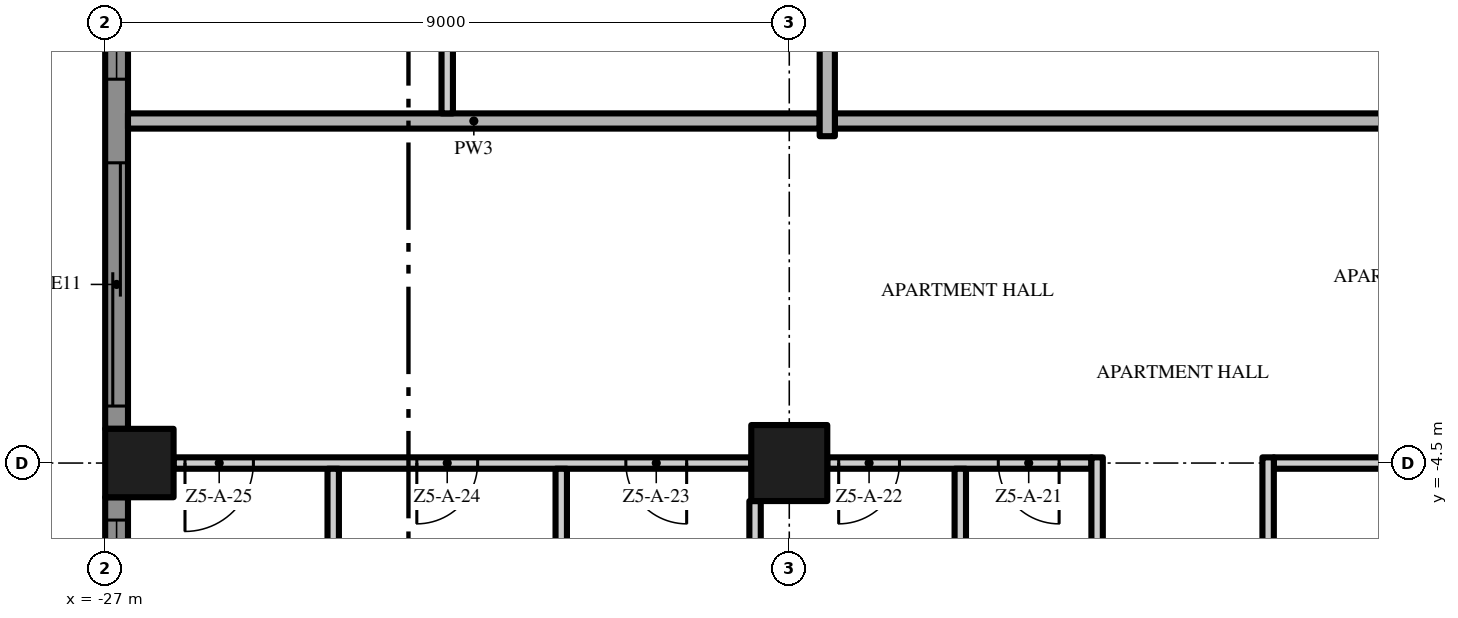
"""IFC4 building model, lengths in metres.
Left out: names, types, materials, properties, quantities, classifications, styles, units other than length and angle.
Written with IfcOpenShell. Run it as: python <this file> out.ifc"""

import sys

from ifc_helpers import new_model, si_unit, direction, frame, frame_2d, origin, origin_2d, place, context, subcontext, project, spatial, polyline, rectangle, outline, extrude, element, fill, save


model = new_model("IFC4")
c1 = context("Model", 3, precision=1e-05, world=origin(), true_north=direction((0.0, 1.0)))
c2 = subcontext(c1, "Body", "Model", "MODEL_VIEW")
j1 = project(units=[si_unit("LENGTHUNIT", "METRE"), si_unit("PLANEANGLEUNIT", "RADIAN")], contexts=[c1])
p1 = place(None, origin())
s1 = spatial("IfcSite", under=j1, at=p1, CompositionType="ELEMENT")
p2 = place(p1, origin())
s2 = spatial("IfcBuilding", under=s1, at=p2, CompositionType="ELEMENT")
p3 = place(p2, frame((0.0, 0.0, 242.6)))
s3 = spatial("IfcBuildingStorey", under=s2, at=p3, CompositionType="ELEMENT", Elevation=242.6)
p4 = place(p3, frame((-18.0, -4.5, 0.0), z_axis=(0.0, 0.0, 1.0), x_axis=(1.0, 0.0, 0.0)))
e1 = element("IfcColumn", 1, at=p4, inside=s3, PredefinedType="COLUMN", context=c2, shape_type="SweptSolid", body=[
    extrude(rectangle(XDim=1.0, YDim=1.0, at=origin_2d()), origin(), (0.0, 0.0, 1.0), 3.5),
])
p5 = place(p3, frame((-26.55, -4.5, 0.0), z_axis=(0.0, 0.0, 1.0), x_axis=(1.0, 0.0, 0.0)))
e2 = element("IfcColumn", 2, at=p5, inside=s3, PredefinedType="COLUMN", context=c2, shape_type="SweptSolid", body=[
    extrude(rectangle(XDim=0.9, YDim=0.9, at=origin_2d()), origin(), (0.0, 0.0, 1.0), 3.5),
])
p6 = place(p3, frame((-26.85, -4.05, 0.0), z_axis=(0.0, 0.0, 1.0), x_axis=(0.0, 1.0, 0.0)))
e3 = element("IfcWall", 3, at=p6, inside=s3, PredefinedType="SOLIDWALL", context=c2, shape_type="SweptSolid", body=[
    extrude(rectangle(XDim=8.1, YDim=0.3, at=frame_2d((4.05, 0.0))), origin(), (0.0, 0.0, 1.0), 3.5),
])
p7 = place(p6, frame((4.6, 0.0, 0.45)))
e4 = element("IfcOpeningElement", 4, at=p7, cuts=e3, PredefinedType="OPENING", context=c2, shape_type="SweptSolid", body=[
    extrude(rectangle(XDim=3.2, YDim=2.65, at=frame_2d((1.6, 1.325))), frame((0.0, 0.16, 0.0), z_axis=(0.0, -1.0, 0.0), x_axis=(1.0, 0.0, 0.0)), (0.0, 0.0, 1.0), 0.32),
])
p8 = place(p6, frame((0.3, 0.0, 0.0)))
e5 = element("IfcOpeningElement", 5, at=p8, cuts=e3, PredefinedType="OPENING", context=c2, shape_type="SweptSolid", body=[
    extrude(rectangle(XDim=3.2, YDim=2.4, at=frame_2d((1.6, 1.2))), frame((0.0, 0.16, 0.0), z_axis=(0.0, -1.0, 0.0), x_axis=(1.0, 0.0, 0.0)), (0.0, 0.0, 1.0), 0.32),
])
p9 = place(p3, frame((-26.85, -13.05, 0.0), z_axis=(0.0, 0.0, 1.0), x_axis=(0.0, 1.0, 0.0)))
e6 = element("IfcWall", 6, at=p9, inside=s3, PredefinedType="SOLIDWALL", context=c2, shape_type="SweptSolid", body=[
    extrude(rectangle(XDim=8.1, YDim=0.3, at=frame_2d((4.05, 0.0))), origin(), (0.0, 0.0, 1.0), 3.5),
])
p10 = place(p9, frame((4.6, 0.0, 0.45)))
e7 = element("IfcOpeningElement", 7, at=p10, cuts=e6, PredefinedType="OPENING", context=c2, shape_type="SweptSolid", body=[
    extrude(rectangle(XDim=3.2, YDim=2.65, at=frame_2d((1.6, 1.325))), frame((0.0, 0.16, 0.0), z_axis=(0.0, -1.0, 0.0), x_axis=(1.0, 0.0, 0.0)), (0.0, 0.0, 1.0), 0.32),
])
p11 = place(p9, frame((0.3, 0.0, 0.45)))
e8 = element("IfcOpeningElement", 8, at=p11, cuts=e6, PredefinedType="OPENING", context=c2, shape_type="SweptSolid", body=[
    extrude(rectangle(XDim=3.2, YDim=2.65, at=frame_2d((1.6, 1.325))), frame((0.0, 0.16, 0.0), z_axis=(0.0, -1.0, 0.0), x_axis=(1.0, 0.0, 0.0)), (0.0, 0.0, 1.0), 0.32),
])
p12 = place(p3, origin())
e9 = element("IfcWall", 9, at=p12, inside=s3, PredefinedType="USERDEFINED", context=c2, shape_type="SweptSolid", body=[
    extrude(outline(polyline([(-28.8, 18.0), (-29.505, 16.5), (-29.941, 15.0), (-30.0, 14.25), (-29.941, 13.5), (-29.505, 12.0), (-28.8, 10.5), (-28.095, 9.0), (-27.659, 7.5), (-27.6, 6.75), (-27.659, 6.0), (-28.095, 4.5), (-28.8, 3.0), (-29.505, 1.5), (-29.941, 0.0), (-30.0, -0.75), (-29.941, -1.5), (-29.505, -3.0), (-28.8, -4.5), (-28.095, -6.0), (-27.659, -7.5), (-27.6, -8.25), (-27.659, -9.0), (-28.095, -10.5), (-28.8, -12.0), (-29.505, -13.5), (-29.941, -15.0), (-30.0, -15.75), (-29.941, -16.5), (-29.505, -18.0), (-29.265, -17.93), (-29.694, -16.455), (-29.749, -15.75), (-29.694, -15.045), (-29.271, -13.589), (-28.574, -12.106), (-27.86, -10.589), (-27.411, -9.045), (-27.349, -8.25), (-27.411, -7.455), (-27.86, -5.911), (-28.574, -4.394), (-29.271, -2.911), (-29.694, -1.455), (-29.749, -0.75), (-29.694, -0.045), (-29.271, 1.411), (-28.574, 2.894), (-27.86, 4.411), (-27.411, 5.955), (-27.349, 6.75), (-27.411, 7.545), (-27.86, 9.089), (-28.574, 10.606), (-29.271, 12.089), (-29.694, 13.545), (-29.749, 14.25), (-29.694, 14.955), (-29.271, 16.411), (-28.574, 17.894), (-28.8, 18.0)])), origin(), (0.0, 0.0, 1.0), 0.9),
])
p13 = place(p3, frame((-18.5, -4.5, 0.0), z_axis=(0.0, 0.0, 1.0), x_axis=(-1.0, 0.0, 0.0)))
e10 = element("IfcWall", 10, at=p13, inside=s3, PredefinedType="PARTITIONING", context=c2, shape_type="SweptSolid", body=[
    extrude(rectangle(XDim=7.6, YDim=0.15, at=frame_2d((3.8, 0.0))), origin(), (0.0, 0.0, 1.0), 3.5),
])
p14 = place(p13, frame((0.85, 0.0, 0.0)))
e11 = element("IfcOpeningElement", 11, at=p14, cuts=e10, PredefinedType="OPENING", context=c2, shape_type="SweptSolid", body=[
    extrude(rectangle(XDim=0.8, YDim=2.0, at=frame_2d((0.4, 1.0))), frame((0.0, 0.085, 0.0), z_axis=(0.0, -1.0, 0.0), x_axis=(1.0, 0.0, 0.0)), (0.0, 0.0, 1.0), 0.17),
])
p15 = place(p13, frame((3.6, 0.0, 0.0)))
e12 = element("IfcOpeningElement", 12, at=p15, cuts=e10, PredefinedType="OPENING", context=c2, shape_type="SweptSolid", body=[
    extrude(rectangle(XDim=0.8, YDim=2.0, at=frame_2d((0.4, 1.0))), frame((0.0, 0.085, 0.0), z_axis=(0.0, -1.0, 0.0), x_axis=(1.0, 0.0, 0.0)), (0.0, 0.0, 1.0), 0.17),
])
p16 = place(p13, frame((6.55, 0.0, 0.0)))
e13 = element("IfcOpeningElement", 13, at=p16, cuts=e10, PredefinedType="OPENING", context=c2, shape_type="SweptSolid", body=[
    extrude(rectangle(XDim=0.9, YDim=2.1, at=frame_2d((0.45, 1.05))), frame((0.0, 0.085, 0.0), z_axis=(0.0, -1.0, 0.0), x_axis=(1.0, 0.0, 0.0)), (0.0, 0.0, 1.0), 0.17),
])
p17 = place(p3, frame((-14.025, -4.5, 0.0), z_axis=(0.0, 0.0, 1.0), x_axis=(-1.0, 0.0, 0.0)))
e14 = element("IfcWall", 14, at=p17, inside=s3, PredefinedType="PARTITIONING", context=c2, shape_type="SweptSolid", body=[
    extrude(rectangle(XDim=3.475, YDim=0.15, at=frame_2d((1.738, 0.0))), origin(), (0.0, 0.0, 1.0), 3.5),
])
p18 = place(p17, frame((0.425, 0.0, 0.0)))
e15 = element("IfcOpeningElement", 15, at=p18, cuts=e14, PredefinedType="OPENING", context=c2, shape_type="SweptSolid", body=[
    extrude(rectangle(XDim=0.8, YDim=2.0, at=frame_2d((0.4, 1.0))), frame((0.0, 0.085, 0.0), z_axis=(0.0, -1.0, 0.0), x_axis=(1.0, 0.0, 0.0)), (0.0, 0.0, 1.0), 0.17),
])
p19 = place(p17, frame((2.525, 0.0, 0.0)))
e16 = element("IfcOpeningElement", 16, at=p19, cuts=e14, PredefinedType="OPENING", context=c2, shape_type="SweptSolid", body=[
    extrude(rectangle(XDim=0.8, YDim=2.0, at=frame_2d((0.4, 1.0))), frame((0.0, 0.085, 0.0), z_axis=(0.0, -1.0, 0.0), x_axis=(1.0, 0.0, 0.0)), (0.0, 0.0, 1.0), 0.17),
])
p20 = place(p3, frame((-11.625, -4.5, 0.0), z_axis=(0.0, 0.0, 1.0), x_axis=(1.0, 0.0, 0.0)))
e17 = element("IfcWall", 17, at=p20, inside=s3, PredefinedType="PARTITIONING", context=c2, shape_type="SweptSolid", body=[
    extrude(rectangle(XDim=2.125, YDim=0.15, at=frame_2d((1.062, 0.0))), origin(), (0.0, 0.0, 1.0), 3.5),
])
p21 = place(p3, frame((17.4, 0.0, 0.0), z_axis=(0.0, 0.0, 1.0), x_axis=(-1.0, 0.0, 0.0)))
e18 = element("IfcWall", 18, at=p21, inside=s3, PredefinedType="PARTITIONING", context=c2, shape_type="SweptSolid", body=[
    extrude(rectangle(XDim=34.8, YDim=0.2, at=frame_2d((17.4, 0.0))), origin(), (0.0, 0.0, 1.0), 3.5),
])
p22 = place(p21, frame((25.65, 0.0, 0.0)))
e19 = element("IfcOpeningElement", 19, at=p22, cuts=e18, PredefinedType="OPENING", context=c2, shape_type="SweptSolid", body=[
    extrude(rectangle(XDim=1.5, YDim=2.4, at=frame_2d((0.75, 1.2))), frame((0.0, 0.11, 0.0), z_axis=(0.0, -1.0, 0.0), x_axis=(1.0, 0.0, 0.0)), (0.0, 0.0, 1.0), 0.22),
])
p23 = place(p21, frame((7.65, 0.0, 0.0)))
e20 = element("IfcOpeningElement", 20, at=p23, cuts=e18, PredefinedType="OPENING", context=c2, shape_type="SweptSolid", body=[
    extrude(rectangle(XDim=1.5, YDim=2.4, at=frame_2d((0.75, 1.2))), frame((0.0, 0.11, 0.0), z_axis=(0.0, -1.0, 0.0), x_axis=(1.0, 0.0, 0.0)), (0.0, 0.0, 1.0), 0.22),
])
p24 = place(p3, frame((-26.7, 0.0, 0.0), z_axis=(0.0, 0.0, 1.0), x_axis=(1.0, 0.0, 0.0)))
e21 = element("IfcWall", 21, at=p24, inside=s3, PredefinedType="PARTITIONING", context=c2, shape_type="SweptSolid", body=[
    extrude(rectangle(XDim=9.1, YDim=0.2, at=frame_2d((4.55, 0.0))), origin(), (0.0, 0.0, 1.0), 3.5),
])
p25 = place(p3, frame((-24.0, -8.925, 0.0), z_axis=(0.0, 0.0, 1.0), x_axis=(0.0, 1.0, 0.0)))
e22 = element("IfcWall", 22, at=p25, inside=s3, PredefinedType="PARTITIONING", context=c2, shape_type="SweptSolid", body=[
    extrude(rectangle(XDim=4.35, YDim=0.15, at=frame_2d((2.175, 0.0))), origin(), (0.0, 0.0, 1.0), 3.5),
])
p26 = place(p3, frame((-22.5, 0.1, 0.0), z_axis=(0.0, 0.0, 1.0), x_axis=(0.0, 1.0, 0.0)))
e23 = element("IfcWall", 23, at=p26, inside=s3, PredefinedType="PARTITIONING", context=c2, shape_type="SweptSolid", body=[
    extrude(rectangle(XDim=17.45, YDim=0.15, at=frame_2d((8.725, 0.0))), origin(), (0.0, 0.0, 1.0), 3.5),
])
p27 = place(p26, frame((1.65, 0.0, 0.0)))
e24 = element("IfcOpeningElement", 24, at=p27, cuts=e23, PredefinedType="OPENING", context=c2, shape_type="SweptSolid", body=[
    extrude(rectangle(XDim=1.0, YDim=2.4, at=frame_2d((0.5, 1.2))), frame((0.0, 0.085, 0.0), z_axis=(0.0, -1.0, 0.0), x_axis=(1.0, 0.0, 0.0)), (0.0, 0.0, 1.0), 0.17),
])
p28 = place(p26, frame((5.0, 0.0, 0.0)))
e25 = element("IfcOpeningElement", 25, at=p28, cuts=e23, PredefinedType="OPENING", context=c2, shape_type="SweptSolid", body=[
    extrude(rectangle(XDim=1.0, YDim=2.4, at=frame_2d((0.5, 1.2))), frame((0.0, 0.085, 0.0), z_axis=(0.0, -1.0, 0.0), x_axis=(1.0, 0.0, 0.0)), (0.0, 0.0, 1.0), 0.17),
])
p29 = place(p26, frame((11.4, 0.0, 0.0)))
e26 = element("IfcOpeningElement", 26, at=p29, cuts=e23, PredefinedType="OPENING", context=c2, shape_type="SweptSolid", body=[
    extrude(rectangle(XDim=1.8, YDim=2.4, at=frame_2d((0.9, 1.2))), frame((0.0, 0.085, 0.0), z_axis=(0.0, -1.0, 0.0), x_axis=(1.0, 0.0, 0.0)), (0.0, 0.0, 1.0), 0.17),
])
p30 = place(p3, frame((-21.0, -8.925, 0.0), z_axis=(0.0, 0.0, 1.0), x_axis=(0.0, 1.0, 0.0)))
e27 = element("IfcWall", 27, at=p30, inside=s3, PredefinedType="PARTITIONING", context=c2, shape_type="SweptSolid", body=[
    extrude(rectangle(XDim=4.35, YDim=0.15, at=frame_2d((2.175, 0.0))), origin(), (0.0, 0.0, 1.0), 3.5),
])
p31 = place(p3, frame((-18.45, -8.925, 0.0), z_axis=(0.0, 0.0, 1.0), x_axis=(0.0, 1.0, 0.0)))
e28 = element("IfcWall", 28, at=p31, inside=s3, PredefinedType="PARTITIONING", context=c2, shape_type="SweptSolid", body=[
    extrude(rectangle(XDim=3.925, YDim=0.15, at=frame_2d((1.962, 0.0))), origin(), (0.0, 0.0, 1.0), 3.5),
])
p32 = place(p3, frame((-17.5, -0.2, 0.0), z_axis=(0.0, 0.0, 1.0), x_axis=(0.0, 1.0, 0.0)))
e29 = element("IfcWall", 29, at=p32, inside=s3, PredefinedType="PARTITIONING", context=c2, shape_type="SweptSolid", body=[
    extrude(rectangle(XDim=4.2, YDim=0.2, at=frame_2d((2.1, 0.0))), origin(), (0.0, 0.0, 1.0), 3.5),
])
p33 = place(p3, frame((-15.75, -8.925, 0.0), z_axis=(0.0, 0.0, 1.0), x_axis=(0.0, 1.0, 0.0)))
e30 = element("IfcWall", 30, at=p33, inside=s3, PredefinedType="PARTITIONING", context=c2, shape_type="SweptSolid", body=[
    extrude(rectangle(XDim=4.35, YDim=0.15, at=frame_2d((2.175, 0.0))), origin(), (0.0, 0.0, 1.0), 3.5),
])
p34 = place(p3, frame((-13.95, -8.925, 0.0), z_axis=(0.0, 0.0, 1.0), x_axis=(0.0, 1.0, 0.0)))
e31 = element("IfcWall", 31, at=p34, inside=s3, PredefinedType="PARTITIONING", context=c2, shape_type="SweptSolid", body=[
    extrude(rectangle(XDim=4.5, YDim=0.15, at=frame_2d((2.25, 0.0))), origin(), (0.0, 0.0, 1.0), 3.5),
])
p35 = place(p3, frame((-11.7, -4.425, 0.0), z_axis=(0.0, 0.0, 1.0), x_axis=(0.0, -1.0, 0.0)))
e32 = element("IfcWall", 32, at=p35, inside=s3, PredefinedType="PARTITIONING", context=c2, shape_type="SweptSolid", body=[
    extrude(rectangle(XDim=4.65, YDim=0.15, at=frame_2d((2.325, 0.0))), origin(), (0.0, 0.0, 1.0), 3.5),
])
p36 = place(p35, frame((1.875, 0.0, 0.0)))
e33 = element("IfcOpeningElement", 33, at=p36, cuts=e32, PredefinedType="OPENING", context=c2, shape_type="SweptSolid", body=[
    extrude(rectangle(XDim=0.9, YDim=2.1, at=frame_2d((0.45, 1.05))), frame((0.0, 0.085, 0.0), z_axis=(0.0, -1.0, 0.0), x_axis=(1.0, 0.0, 0.0)), (0.0, 0.0, 1.0), 0.17),
])
p37 = place(p7, origin())
e34 = element("IfcWindow", 34, at=p37, inside=s3, PartitioningType="SINGLE_PANEL", PredefinedType="WINDOW", context=c2, shape_type="SweptSolid", body=[
    extrude(rectangle(XDim=3.2, YDim=2.65, at=frame_2d((1.6, 1.325))), frame((0.0, 0.03, 0.0), z_axis=(0.0, -1.0, 0.0), x_axis=(1.0, 0.0, 0.0)), (0.0, 0.0, 1.0), 0.06),
])
fill(e4, e34)
p38 = place(p8, origin())
e35 = element("IfcDoor", 35, at=p38, inside=s3, OperationType="SINGLE_SWING_LEFT", PredefinedType="DOOR", context=c2, shape_type="SweptSolid", body=[
    extrude(rectangle(XDim=3.2, YDim=2.4, at=frame_2d((1.6, 1.2))), frame((0.0, 0.025, 0.0), z_axis=(0.0, -1.0, 0.0), x_axis=(1.0, 0.0, 0.0)), (0.0, 0.0, 1.0), 0.05),
])
fill(e5, e35)
p39 = place(p10, origin())
e36 = element("IfcWindow", 36, at=p39, inside=s3, PartitioningType="SINGLE_PANEL", PredefinedType="WINDOW", context=c2, shape_type="SweptSolid", body=[
    extrude(rectangle(XDim=3.2, YDim=2.65, at=frame_2d((1.6, 1.325))), frame((0.0, 0.03, 0.0), z_axis=(0.0, -1.0, 0.0), x_axis=(1.0, 0.0, 0.0)), (0.0, 0.0, 1.0), 0.06),
])
fill(e7, e36)
p40 = place(p18, origin())
e37 = element("IfcDoor", 37, at=p40, inside=s3, OperationType="SINGLE_SWING_LEFT", PredefinedType="DOOR", context=c2, shape_type="SweptSolid", body=[
    extrude(rectangle(XDim=0.8, YDim=2.0, at=frame_2d((0.4, 1.0))), frame((0.0, 0.025, 0.0), z_axis=(0.0, -1.0, 0.0), x_axis=(1.0, 0.0, 0.0)), (0.0, 0.0, 1.0), 0.05),
])
fill(e15, e37)
p41 = place(p19, origin())
e38 = element("IfcDoor", 38, at=p41, inside=s3, OperationType="SINGLE_SWING_RIGHT", PredefinedType="DOOR", context=c2, shape_type="SweptSolid", body=[
    extrude(rectangle(XDim=0.8, YDim=2.0, at=frame_2d((0.4, 1.0))), frame((0.0, 0.025, 0.0), z_axis=(0.0, -1.0, 0.0), x_axis=(1.0, 0.0, 0.0)), (0.0, 0.0, 1.0), 0.05),
])
fill(e16, e38)
p42 = place(p14, origin())
e39 = element("IfcDoor", 39, at=p42, inside=s3, OperationType="SINGLE_SWING_LEFT", PredefinedType="DOOR", context=c2, shape_type="SweptSolid", body=[
    extrude(rectangle(XDim=0.8, YDim=2.0, at=frame_2d((0.4, 1.0))), frame((0.0, 0.025, 0.0), z_axis=(0.0, -1.0, 0.0), x_axis=(1.0, 0.0, 0.0)), (0.0, 0.0, 1.0), 0.05),
])
fill(e11, e39)
p43 = place(p15, origin())
e40 = element("IfcDoor", 40, at=p43, inside=s3, OperationType="SINGLE_SWING_RIGHT", PredefinedType="DOOR", context=c2, shape_type="SweptSolid", body=[
    extrude(rectangle(XDim=0.8, YDim=2.0, at=frame_2d((0.4, 1.0))), frame((0.0, 0.025, 0.0), z_axis=(0.0, -1.0, 0.0), x_axis=(1.0, 0.0, 0.0)), (0.0, 0.0, 1.0), 0.05),
])
fill(e12, e40)
p44 = place(p16, origin())
e41 = element("IfcDoor", 41, at=p44, inside=s3, OperationType="SINGLE_SWING_RIGHT", PredefinedType="DOOR", context=c2, shape_type="SweptSolid", body=[
    extrude(rectangle(XDim=0.9, YDim=2.1, at=frame_2d((0.45, 1.05))), frame((0.0, 0.025, 0.0), z_axis=(0.0, -1.0, 0.0), x_axis=(1.0, 0.0, 0.0)), (0.0, 0.0, 1.0), 0.05),
])
fill(e13, e41)
save(model, sys.argv[1])
